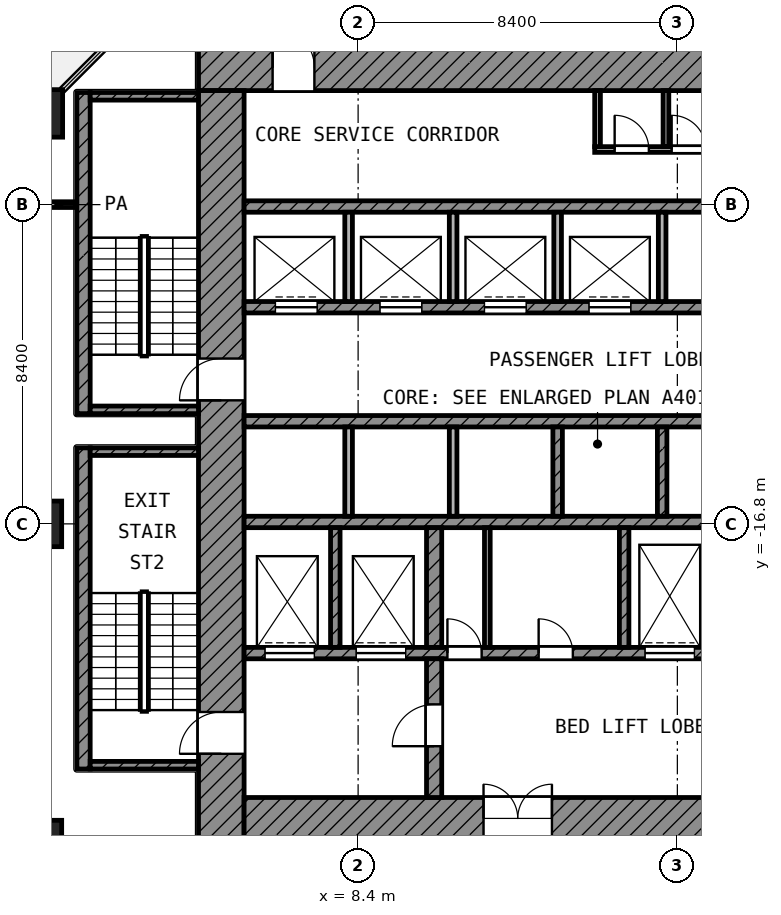
"""IFC4 building model, lengths in metres.
Left out: names, types, materials, properties, quantities, classifications, styles, units other than length and angle.
Written with IfcOpenShell. Run it as: python <this file> out.ifc"""

import sys

from ifc_helpers import new_model, si_unit, direction, frame, frame_2d, origin, origin_2d, place, context, subcontext, project, spatial, rectangle, extrude, element, fill, save


model = new_model("IFC4")
c1 = context("Model", 3, precision=1e-05, world=origin(), true_north=direction((0.0, 1.0)))
c2 = subcontext(c1, "Body", "Model", "MODEL_VIEW")
j1 = project(units=[si_unit("LENGTHUNIT", "METRE"), si_unit("PLANEANGLEUNIT", "RADIAN")], contexts=[c1])
p1 = place(None, origin())
s1 = spatial("IfcSite", under=j1, at=p1, CompositionType="ELEMENT")
p2 = place(p1, origin())
s2 = spatial("IfcBuilding", under=s1, at=p2, CompositionType="ELEMENT")
p3 = place(p2, frame((0.0, 0.0, 85.4)))
s3 = spatial("IfcBuildingStorey", under=s2, at=p3, CompositionType="ELEMENT", Elevation=85.4)
p4 = place(p3, frame((0.0, -6.0, 0.0), z_axis=(0.0, 0.0, 1.0), x_axis=(1.0, 0.0, 0.0)))
e1 = element("IfcColumn", 1, at=p4, inside=s3, PredefinedType="COLUMN", context=c2, shape_type="SweptSolid", body=[
    extrude(rectangle(XDim=1.25, YDim=1.25, at=origin_2d()), origin(), (0.0, 0.0, 1.0), 4.2),
])
for number, where, z_axis, x_axis in (
    (2, (0.0, -16.8, 0.0), (0.0, 0.0, 1.0), (1.0, 0.0, 0.0)),
    (3, (0.0, -25.2, 0.0), (0.0, 0.0, 1.0), (1.0, 0.0, 0.0)),
):
    element("IfcColumn", number, at=place(p3, frame(where, z_axis=z_axis, x_axis=x_axis)), inside=s3, PredefinedType="COLUMN", context=c2, shape_type="SweptSolid", body=[
        extrude(rectangle(XDim=1.2, YDim=1.2, at=origin_2d()), origin(), (0.0, 0.0, 1.0), 4.2),
    ])
p5 = place(p3, frame((4.2, -4.8, 0.0), z_axis=(0.0, 0.0, 1.0), x_axis=(1.0, 0.0, 0.0)))
e4 = element("IfcWall", 4, at=p5, inside=s3, PredefinedType="SHEAR", context=c2, shape_type="SweptSolid", body=[
    extrude(rectangle(XDim=20.9, YDim=1.2, at=frame_2d((10.45, 0.0))), origin(), (0.0, 0.0, 1.0), 3.9),
])
p6 = place(p5, frame((1.95, 0.0, 0.0)))
e5 = element("IfcOpeningElement", 5, at=p6, cuts=e4, PredefinedType="OPENING", context=c2, shape_type="SweptSolid", body=[
    extrude(rectangle(XDim=1.1, YDim=2.1, at=frame_2d((0.55, 1.05))), frame((0.0, 0.61, 0.0), z_axis=(0.0, -1.0, 0.0), x_axis=(1.0, 0.0, 0.0)), (0.0, 0.0, 1.0), 1.22),
])
p7 = place(p5, frame((17.95, 0.0, 0.0)))
e6 = element("IfcOpeningElement", 6, at=p7, cuts=e4, PredefinedType="OPENING", context=c2, shape_type="SweptSolid", body=[
    extrude(rectangle(XDim=1.1, YDim=2.1, at=frame_2d((0.55, 1.05))), frame((0.0, 0.61, 0.0), z_axis=(0.0, -1.0, 0.0), x_axis=(1.0, 0.0, 0.0)), (0.0, 0.0, 1.0), 1.22),
])
p8 = place(p3, frame((4.8, -25.1, 0.0), z_axis=(0.0, 0.0, 1.0), x_axis=(0.0, 1.0, 0.0)))
e7 = element("IfcWall", 7, at=p8, inside=s3, PredefinedType="SHEAR", context=c2, shape_type="SweptSolid", body=[
    extrude(rectangle(XDim=19.7, YDim=1.2, at=frame_2d((9.85, 0.0))), origin(), (0.0, 0.0, 1.0), 3.9),
])
p9 = place(p8, frame((11.55, 0.0, 0.0)))
e8 = element("IfcOpeningElement", 8, at=p9, cuts=e7, PredefinedType="OPENING", context=c2, shape_type="SweptSolid", body=[
    extrude(rectangle(XDim=1.1, YDim=2.1, at=frame_2d((0.55, 1.05))), frame((0.0, 0.61, 0.0), z_axis=(0.0, -1.0, 0.0), x_axis=(1.0, 0.0, 0.0)), (0.0, 0.0, 1.0), 1.22),
])
p10 = place(p8, frame((2.25, 0.0, 0.0)))
e9 = element("IfcOpeningElement", 9, at=p10, cuts=e7, PredefinedType="OPENING", context=c2, shape_type="SweptSolid", body=[
    extrude(rectangle(XDim=1.1, YDim=2.1, at=frame_2d((0.55, 1.05))), frame((0.0, 0.61, 0.0), z_axis=(0.0, -1.0, 0.0), x_axis=(1.0, 0.0, 0.0)), (0.0, 0.0, 1.0), 1.22),
])
p11 = place(p3, frame((5.4, -24.55, 0.0), z_axis=(0.0, 0.0, 1.0), x_axis=(1.0, 0.0, 0.0)))
e10 = element("IfcWall", 10, at=p11, inside=s3, PredefinedType="SHEAR", context=c2, shape_type="SweptSolid", body=[
    extrude(rectangle(XDim=18.6, YDim=1.1, at=frame_2d((9.3, 0.0))), origin(), (0.0, 0.0, 1.0), 3.9),
])
p12 = place(p11, frame((6.3, 0.0, 0.0)))
e11 = element("IfcOpeningElement", 11, at=p12, cuts=e10, PredefinedType="OPENING", context=c2, shape_type="SweptSolid", body=[
    extrude(rectangle(XDim=1.8, YDim=2.1, at=frame_2d((0.9, 1.05))), frame((0.0, 0.56, 0.0), z_axis=(0.0, -1.0, 0.0), x_axis=(1.0, 0.0, 0.0)), (0.0, 0.0, 1.0), 1.12),
])
p13 = place(p3, frame((5.4, -8.45, 0.0), z_axis=(0.0, 0.0, 1.0), x_axis=(1.0, 0.0, 0.0)))
e12 = element("IfcWall", 12, at=p13, inside=s3, PredefinedType="SHEAR", context=c2, shape_type="SweptSolid", body=[
    extrude(rectangle(XDim=16.65, YDim=0.3, at=frame_2d((8.325, 0.0))), origin(), (0.0, 0.0, 1.0), 3.9),
])
p14 = place(p3, frame((5.4, -11.1, 0.0), z_axis=(0.0, 0.0, 1.0), x_axis=(1.0, 0.0, 0.0)))
e13 = element("IfcWall", 13, at=p14, inside=s3, PredefinedType="SHEAR", context=c2, shape_type="SweptSolid", body=[
    extrude(rectangle(XDim=16.65, YDim=0.3, at=frame_2d((8.325, 0.0))), origin(), (0.0, 0.0, 1.0), 3.9),
])
p15 = place(p14, frame((0.825, 0.0, 0.0)))
e14 = element("IfcOpeningElement", 14, at=p15, cuts=e13, PredefinedType="OPENING", context=c2, shape_type="SweptSolid", body=[
    extrude(rectangle(XDim=1.1, YDim=2.1, at=frame_2d((0.55, 1.05))), frame((0.0, 0.16, 0.0), z_axis=(0.0, -1.0, 0.0), x_axis=(1.0, 0.0, 0.0)), (0.0, 0.0, 1.0), 0.32),
])
p16 = place(p14, frame((3.575, 0.0, 0.0)))
e15 = element("IfcOpeningElement", 15, at=p16, cuts=e13, PredefinedType="OPENING", context=c2, shape_type="SweptSolid", body=[
    extrude(rectangle(XDim=1.1, YDim=2.1, at=frame_2d((0.55, 1.05))), frame((0.0, 0.16, 0.0), z_axis=(0.0, -1.0, 0.0), x_axis=(1.0, 0.0, 0.0)), (0.0, 0.0, 1.0), 0.32),
])
p17 = place(p14, frame((6.325, 0.0, 0.0)))
e16 = element("IfcOpeningElement", 16, at=p17, cuts=e13, PredefinedType="OPENING", context=c2, shape_type="SweptSolid", body=[
    extrude(rectangle(XDim=1.1, YDim=2.1, at=frame_2d((0.55, 1.05))), frame((0.0, 0.16, 0.0), z_axis=(0.0, -1.0, 0.0), x_axis=(1.0, 0.0, 0.0)), (0.0, 0.0, 1.0), 0.32),
])
p18 = place(p14, frame((9.075, 0.0, 0.0)))
e17 = element("IfcOpeningElement", 17, at=p18, cuts=e13, PredefinedType="OPENING", context=c2, shape_type="SweptSolid", body=[
    extrude(rectangle(XDim=1.1, YDim=2.1, at=frame_2d((0.55, 1.05))), frame((0.0, 0.16, 0.0), z_axis=(0.0, -1.0, 0.0), x_axis=(1.0, 0.0, 0.0)), (0.0, 0.0, 1.0), 0.32),
])
for number, where, z_axis, x_axis in (
    (18, (5.4, -14.1, 0.0), (0.0, 0.0, 1.0), (1.0, 0.0, 0.0)),
    (19, (5.4, -16.75, 0.0), (0.0, 0.0, 1.0), (1.0, 0.0, 0.0)),
):
    element("IfcWall", number, at=place(p3, frame(where, z_axis=z_axis, x_axis=x_axis)), inside=s3, PredefinedType="SHEAR", context=c2, shape_type="SweptSolid", body=[
        extrude(rectangle(XDim=16.65, YDim=0.3, at=frame_2d((8.325, 0.0))), origin(), (0.0, 0.0, 1.0), 3.9),
    ])
p19 = place(p3, frame((5.4, -20.2, 0.0), z_axis=(0.0, 0.0, 1.0), x_axis=(1.0, 0.0, 0.0)))
e20 = element("IfcWall", 20, at=p19, inside=s3, PredefinedType="SHEAR", context=c2, shape_type="SweptSolid", body=[
    extrude(rectangle(XDim=14.65, YDim=0.3, at=frame_2d((7.325, 0.0))), origin(), (0.0, 0.0, 1.0), 3.9),
])
p20 = place(p19, frame((10.55, 0.0, 0.0)))
e21 = element("IfcOpeningElement", 21, at=p20, cuts=e20, PredefinedType="OPENING", context=c2, shape_type="SweptSolid", body=[
    extrude(rectangle(XDim=1.3, YDim=2.1, at=frame_2d((0.65, 1.05))), frame((0.0, 0.16, 0.0), z_axis=(0.0, -1.0, 0.0), x_axis=(1.0, 0.0, 0.0)), (0.0, 0.0, 1.0), 0.32),
])
p21 = place(p19, frame((12.95, 0.0, 0.0)))
e22 = element("IfcOpeningElement", 22, at=p21, cuts=e20, PredefinedType="OPENING", context=c2, shape_type="SweptSolid", body=[
    extrude(rectangle(XDim=1.3, YDim=2.1, at=frame_2d((0.65, 1.05))), frame((0.0, 0.16, 0.0), z_axis=(0.0, -1.0, 0.0), x_axis=(1.0, 0.0, 0.0)), (0.0, 0.0, 1.0), 0.32),
])
p22 = place(p19, frame((0.55, 0.0, 0.0)))
e23 = element("IfcOpeningElement", 23, at=p22, cuts=e20, PredefinedType="OPENING", context=c2, shape_type="SweptSolid", body=[
    extrude(rectangle(XDim=1.3, YDim=2.1, at=frame_2d((0.65, 1.05))), frame((0.0, 0.16, 0.0), z_axis=(0.0, -1.0, 0.0), x_axis=(1.0, 0.0, 0.0)), (0.0, 0.0, 1.0), 0.32),
])
p23 = place(p19, frame((2.95, 0.0, 0.0)))
e24 = element("IfcOpeningElement", 24, at=p23, cuts=e20, PredefinedType="OPENING", context=c2, shape_type="SweptSolid", body=[
    extrude(rectangle(XDim=1.3, YDim=2.1, at=frame_2d((0.65, 1.05))), frame((0.0, 0.16, 0.0), z_axis=(0.0, -1.0, 0.0), x_axis=(1.0, 0.0, 0.0)), (0.0, 0.0, 1.0), 0.32),
])
p24 = place(p19, frame((5.35, 0.0, 0.0)))
e25 = element("IfcOpeningElement", 25, at=p24, cuts=e20, PredefinedType="OPENING", context=c2, shape_type="SweptSolid", body=[
    extrude(rectangle(XDim=0.9, YDim=2.1, at=frame_2d((0.45, 1.05))), frame((0.0, 0.16, 0.0), z_axis=(0.0, -1.0, 0.0), x_axis=(1.0, 0.0, 0.0)), (0.0, 0.0, 1.0), 0.32),
])
p25 = place(p19, frame((7.75, 0.0, 0.0)))
e26 = element("IfcOpeningElement", 26, at=p25, cuts=e20, PredefinedType="OPENING", context=c2, shape_type="SweptSolid", body=[
    extrude(rectangle(XDim=0.9, YDim=2.1, at=frame_2d((0.45, 1.05))), frame((0.0, 0.16, 0.0), z_axis=(0.0, -1.0, 0.0), x_axis=(1.0, 0.0, 0.0)), (0.0, 0.0, 1.0), 0.32),
])
p26 = place(p3, frame((10.4, -24.0, 0.0), z_axis=(0.0, 0.0, 1.0), x_axis=(0.0, 1.0, 0.0)))
e27 = element("IfcWall", 27, at=p26, inside=s3, PredefinedType="SHEAR", context=c2, shape_type="SweptSolid", body=[
    extrude(rectangle(XDim=3.65, YDim=0.4, at=frame_2d((1.825, 0.0))), origin(), (0.0, 0.0, 1.0), 3.9),
])
p27 = place(p26, frame((1.35, 0.0, 0.0)))
e28 = element("IfcOpeningElement", 28, at=p27, cuts=e27, PredefinedType="OPENING", context=c2, shape_type="SweptSolid", body=[
    extrude(rectangle(XDim=1.1, YDim=2.1, at=frame_2d((0.55, 1.05))), frame((0.0, 0.21, 0.0), z_axis=(0.0, -1.0, 0.0), x_axis=(1.0, 0.0, 0.0)), (0.0, 0.0, 1.0), 0.42),
])
p28 = place(p3, frame((10.4, -20.05, 0.0), z_axis=(0.0, 0.0, 1.0), x_axis=(0.0, 1.0, 0.0)))
e29 = element("IfcWall", 29, at=p28, inside=s3, PredefinedType="SHEAR", context=c2, shape_type="SweptSolid", body=[
    extrude(rectangle(XDim=3.15, YDim=0.4, at=frame_2d((1.575, 0.0))), origin(), (0.0, 0.0, 1.0), 3.9),
])
for number, where, z_axis, x_axis in (
    (30, (7.8, -20.05, 0.0), (0.0, 0.0, 1.0), (0.0, 1.0, 0.0)),
    (31, (15.4, -20.05, 0.0), (0.0, 0.0, 1.0), (0.0, 1.0, 0.0)),
):
    element("IfcWall", number, at=place(p3, frame(where, z_axis=z_axis, x_axis=x_axis)), inside=s3, PredefinedType="SHEAR", context=c2, shape_type="SweptSolid", body=[
        extrude(rectangle(XDim=3.15, YDim=0.25, at=frame_2d((1.575, 0.0))), origin(), (0.0, 0.0, 1.0), 3.9),
    ])
for number, where, z_axis, x_axis in (
    (32, (8.15, -10.95, 0.0), (0.0, 0.0, 1.0), (0.0, 1.0, 0.0)),
    (33, (10.9, -10.95, 0.0), (0.0, 0.0, 1.0), (0.0, 1.0, 0.0)),
    (34, (13.65, -10.95, 0.0), (0.0, 0.0, 1.0), (0.0, 1.0, 0.0)),
    (35, (16.4, -10.95, 0.0), (0.0, 0.0, 1.0), (0.0, 1.0, 0.0)),
):
    element("IfcWall", number, at=place(p3, frame(where, z_axis=z_axis, x_axis=x_axis)), inside=s3, PredefinedType="PARTITIONING", context=c2, shape_type="SweptSolid", body=[
        extrude(rectangle(XDim=2.35, YDim=0.2, at=frame_2d((1.175, 0.0))), origin(), (0.0, 0.0, 1.0), 3.9),
    ])
for number, where, z_axis, x_axis in (
    (36, (8.15, -16.6, 0.0), (0.0, 0.0, 1.0), (0.0, 1.0, 0.0)),
    (37, (10.9, -16.6, 0.0), (0.0, 0.0, 1.0), (0.0, 1.0, 0.0)),
):
    element("IfcWall", number, at=place(p3, frame(where, z_axis=z_axis, x_axis=x_axis)), inside=s3, PredefinedType="PARTITIONING", context=c2, shape_type="SweptSolid", body=[
        extrude(rectangle(XDim=2.35, YDim=0.2, at=frame_2d((1.175, 0.0))), origin(), (0.0, 0.0, 1.0), 3.9),
    ])
for number, where, z_axis, x_axis in (
    (38, (13.65, -16.6, 0.0), (0.0, 0.0, 1.0), (0.0, 1.0, 0.0)),
    (39, (16.4, -16.6, 0.0), (0.0, 0.0, 1.0), (0.0, 1.0, 0.0)),
):
    element("IfcWall", number, at=place(p3, frame(where, z_axis=z_axis, x_axis=x_axis)), inside=s3, PredefinedType="SHEAR", context=c2, shape_type="SweptSolid", body=[
        extrude(rectangle(XDim=2.35, YDim=0.25, at=frame_2d((1.175, 0.0))), origin(), (0.0, 0.0, 1.0), 3.9),
    ])
p29 = place(p3, frame((14.625, -6.95, 0.0), z_axis=(0.0, 0.0, 1.0), x_axis=(1.0, 0.0, 0.0)))
e40 = element("IfcWall", 40, at=p29, inside=s3, PredefinedType="PARTITIONING", context=c2, shape_type="SweptSolid", body=[
    extrude(rectangle(XDim=6.45, YDim=0.15, at=frame_2d((3.225, 0.0))), origin(), (0.0, 0.0, 1.0), 3.9),
])
p30 = place(p29, frame((0.525, 0.0, 0.0)))
e41 = element("IfcOpeningElement", 41, at=p30, cuts=e40, PredefinedType="OPENING", context=c2, shape_type="SweptSolid", body=[
    extrude(rectangle(XDim=0.9, YDim=2.1, at=frame_2d((0.45, 1.05))), frame((0.0, 0.085, 0.0), z_axis=(0.0, -1.0, 0.0), x_axis=(1.0, 0.0, 0.0)), (0.0, 0.0, 1.0), 0.17),
])
p31 = place(p29, frame((2.025, 0.0, 0.0)))
e42 = element("IfcOpeningElement", 42, at=p31, cuts=e40, PredefinedType="OPENING", context=c2, shape_type="SweptSolid", body=[
    extrude(rectangle(XDim=0.9, YDim=2.1, at=frame_2d((0.45, 1.05))), frame((0.0, 0.085, 0.0), z_axis=(0.0, -1.0, 0.0), x_axis=(1.0, 0.0, 0.0)), (0.0, 0.0, 1.0), 0.17),
])
p32 = place(p29, frame((3.825, 0.0, 0.0)))
e43 = element("IfcOpeningElement", 43, at=p32, cuts=e40, PredefinedType="OPENING", context=c2, shape_type="SweptSolid", body=[
    extrude(rectangle(XDim=0.9, YDim=2.1, at=frame_2d((0.45, 1.05))), frame((0.0, 0.085, 0.0), z_axis=(0.0, -1.0, 0.0), x_axis=(1.0, 0.0, 0.0)), (0.0, 0.0, 1.0), 0.17),
])
p33 = place(p29, frame((5.475, 0.0, 0.0)))
e44 = element("IfcOpeningElement", 44, at=p33, cuts=e40, PredefinedType="OPENING", context=c2, shape_type="SweptSolid", body=[
    extrude(rectangle(XDim=0.9, YDim=2.1, at=frame_2d((0.45, 1.05))), frame((0.0, 0.085, 0.0), z_axis=(0.0, -1.0, 0.0), x_axis=(1.0, 0.0, 0.0)), (0.0, 0.0, 1.0), 0.17),
])
p34 = place(p3, frame((11.8, -20.05, 0.0), z_axis=(0.0, 0.0, 1.0), x_axis=(0.0, 1.0, 0.0)))
e45 = element("IfcWall", 45, at=p34, inside=s3, PredefinedType="PARTITIONING", context=c2, shape_type="SweptSolid", body=[
    extrude(rectangle(XDim=3.15, YDim=0.15, at=frame_2d((1.575, 0.0))), origin(), (0.0, 0.0, 1.0), 3.9),
])
for number, where, z_axis, x_axis in (
    (46, (14.7, -6.875, 0.0), (0.0, 0.0, 1.0), (0.0, 1.0, 0.0)),
    (47, (16.5, -6.875, 0.0), (0.0, 0.0, 1.0), (0.0, 1.0, 0.0)),
):
    element("IfcWall", number, at=place(p3, frame(where, z_axis=z_axis, x_axis=x_axis)), inside=s3, PredefinedType="PARTITIONING", context=c2, shape_type="SweptSolid", body=[
        extrude(rectangle(XDim=1.475, YDim=0.15, at=frame_2d((0.738, 0.0))), origin(), (0.0, 0.0, 1.0), 3.9),
    ])
p35 = place(p3, frame((1.175, -13.9, 0.0), z_axis=(0.0, 0.0, 1.0), x_axis=(0.0, 1.0, 0.0)))
e48 = element("IfcWall", 48, at=p35, inside=s3, PredefinedType="SHEAR", context=c2, shape_type="SweptSolid", body=[
    extrude(rectangle(XDim=8.45, YDim=0.35, at=frame_2d((4.225, 0.0))), origin(), (0.0, 0.0, 1.0), 3.9),
])
for number, where, z_axis, x_axis in (
    (49, (1.35, -5.55, 0.0), (0.0, 0.0, 1.0), (1.0, 0.0, 0.0)),
    (50, (1.35, -13.8, 0.0), (0.0, 0.0, 1.0), (1.0, 0.0, 0.0)),
):
    element("IfcWall", number, at=place(p3, frame(where, z_axis=z_axis, x_axis=x_axis)), inside=s3, PredefinedType="SHEAR", context=c2, shape_type="SweptSolid", body=[
        extrude(rectangle(XDim=2.85, YDim=0.2, at=frame_2d((1.425, 0.0))), origin(), (0.0, 0.0, 1.0), 3.9),
    ])
p36 = place(p3, frame((1.175, -23.25, 0.0), z_axis=(0.0, 0.0, 1.0), x_axis=(0.0, 1.0, 0.0)))
e51 = element("IfcWall", 51, at=p36, inside=s3, PredefinedType="SHEAR", context=c2, shape_type="SweptSolid", body=[
    extrude(rectangle(XDim=8.45, YDim=0.35, at=frame_2d((4.225, 0.0))), origin(), (0.0, 0.0, 1.0), 3.9),
])
for number, where, z_axis, x_axis in (
    (52, (1.35, -14.9, 0.0), (0.0, 0.0, 1.0), (1.0, 0.0, 0.0)),
    (53, (1.35, -23.15, 0.0), (0.0, 0.0, 1.0), (1.0, 0.0, 0.0)),
):
    element("IfcWall", number, at=place(p3, frame(where, z_axis=z_axis, x_axis=x_axis)), inside=s3, PredefinedType="SHEAR", context=c2, shape_type="SweptSolid", body=[
        extrude(rectangle(XDim=2.85, YDim=0.2, at=frame_2d((1.425, 0.0))), origin(), (0.0, 0.0, 1.0), 3.9),
    ])
p37 = place(p3, frame((0.08, -8.4, 0.0), z_axis=(0.0, 0.0, 1.0), x_axis=(1.0, 0.0, 0.0)))
e54 = element("IfcWall", 54, at=p37, inside=s3, PredefinedType="PARTITIONING", context=c2, shape_type="SweptSolid", body=[
    extrude(rectangle(XDim=0.89, YDim=0.15, at=frame_2d((0.445, 0.0))), origin(), (0.0, 0.0, 1.0), 3.9),
])
p38 = place(p15, origin())
e55 = element("IfcDoor", 55, at=p38, inside=s3, OperationType="DOUBLE_DOOR_SLIDING", PredefinedType="DOOR", context=c2, shape_type="SweptSolid", body=[
    extrude(rectangle(XDim=1.1, YDim=2.1, at=frame_2d((0.55, 1.05))), frame((0.0, 0.025, 0.0), z_axis=(0.0, -1.0, 0.0), x_axis=(1.0, 0.0, 0.0)), (0.0, 0.0, 1.0), 0.05),
])
fill(e14, e55)
p39 = place(p16, origin())
e56 = element("IfcDoor", 56, at=p39, inside=s3, OperationType="DOUBLE_DOOR_SLIDING", PredefinedType="DOOR", context=c2, shape_type="SweptSolid", body=[
    extrude(rectangle(XDim=1.1, YDim=2.1, at=frame_2d((0.55, 1.05))), frame((0.0, 0.025, 0.0), z_axis=(0.0, -1.0, 0.0), x_axis=(1.0, 0.0, 0.0)), (0.0, 0.0, 1.0), 0.05),
])
fill(e15, e56)
p40 = place(p17, origin())
e57 = element("IfcDoor", 57, at=p40, inside=s3, OperationType="DOUBLE_DOOR_SLIDING", PredefinedType="DOOR", context=c2, shape_type="SweptSolid", body=[
    extrude(rectangle(XDim=1.1, YDim=2.1, at=frame_2d((0.55, 1.05))), frame((0.0, 0.025, 0.0), z_axis=(0.0, -1.0, 0.0), x_axis=(1.0, 0.0, 0.0)), (0.0, 0.0, 1.0), 0.05),
])
fill(e16, e57)
p41 = place(p18, origin())
e58 = element("IfcDoor", 58, at=p41, inside=s3, OperationType="DOUBLE_DOOR_SLIDING", PredefinedType="DOOR", context=c2, shape_type="SweptSolid", body=[
    extrude(rectangle(XDim=1.1, YDim=2.1, at=frame_2d((0.55, 1.05))), frame((0.0, 0.025, 0.0), z_axis=(0.0, -1.0, 0.0), x_axis=(1.0, 0.0, 0.0)), (0.0, 0.0, 1.0), 0.05),
])
fill(e17, e58)
p42 = place(p20, origin())
e59 = element("IfcDoor", 59, at=p42, inside=s3, OperationType="DOUBLE_DOOR_SLIDING", PredefinedType="DOOR", context=c2, shape_type="SweptSolid", body=[
    extrude(rectangle(XDim=1.3, YDim=2.1, at=frame_2d((0.65, 1.05))), frame((0.0, 0.025, 0.0), z_axis=(0.0, -1.0, 0.0), x_axis=(1.0, 0.0, 0.0)), (0.0, 0.0, 1.0), 0.05),
])
fill(e21, e59)
p43 = place(p22, origin())
e60 = element("IfcDoor", 60, at=p43, inside=s3, OperationType="DOUBLE_DOOR_SLIDING", PredefinedType="DOOR", context=c2, shape_type="SweptSolid", body=[
    extrude(rectangle(XDim=1.3, YDim=2.1, at=frame_2d((0.65, 1.05))), frame((0.0, 0.025, 0.0), z_axis=(0.0, -1.0, 0.0), x_axis=(1.0, 0.0, 0.0)), (0.0, 0.0, 1.0), 0.05),
])
fill(e23, e60)
p44 = place(p23, origin())
e61 = element("IfcDoor", 61, at=p44, inside=s3, OperationType="DOUBLE_DOOR_SLIDING", PredefinedType="DOOR", context=c2, shape_type="SweptSolid", body=[
    extrude(rectangle(XDim=1.3, YDim=2.1, at=frame_2d((0.65, 1.05))), frame((0.0, 0.025, 0.0), z_axis=(0.0, -1.0, 0.0), x_axis=(1.0, 0.0, 0.0)), (0.0, 0.0, 1.0), 0.05),
])
fill(e24, e61)
p45 = place(p9, origin())
e62 = element("IfcDoor", 62, at=p45, inside=s3, OperationType="SINGLE_SWING_LEFT", PredefinedType="DOOR", context=c2, shape_type="SweptSolid", body=[
    extrude(rectangle(XDim=1.1, YDim=2.1, at=frame_2d((0.55, 1.05))), frame((0.0, 0.025, 0.0), z_axis=(0.0, -1.0, 0.0), x_axis=(1.0, 0.0, 0.0)), (0.0, 0.0, 1.0), 0.05),
])
fill(e8, e62)
p46 = place(p10, origin())
e63 = element("IfcDoor", 63, at=p46, inside=s3, OperationType="SINGLE_SWING_LEFT", PredefinedType="DOOR", context=c2, shape_type="SweptSolid", body=[
    extrude(rectangle(XDim=1.1, YDim=2.1, at=frame_2d((0.55, 1.05))), frame((0.0, 0.025, 0.0), z_axis=(0.0, -1.0, 0.0), x_axis=(1.0, 0.0, 0.0)), (0.0, 0.0, 1.0), 0.05),
])
fill(e9, e63)
p47 = place(p6, origin())
e64 = element("IfcDoor", 64, at=p47, inside=s3, OperationType="SINGLE_SWING_LEFT", PredefinedType="DOOR", context=c2, shape_type="SweptSolid", body=[
    extrude(rectangle(XDim=1.1, YDim=2.1, at=frame_2d((0.55, 1.05))), frame((0.0, 0.025, 0.0), z_axis=(0.0, -1.0, 0.0), x_axis=(1.0, 0.0, 0.0)), (0.0, 0.0, 1.0), 0.05),
])
fill(e5, e64)
p48 = place(p27, origin())
e65 = element("IfcDoor", 65, at=p48, inside=s3, OperationType="SINGLE_SWING_LEFT", PredefinedType="DOOR", context=c2, shape_type="SweptSolid", body=[
    extrude(rectangle(XDim=1.1, YDim=2.1, at=frame_2d((0.55, 1.05))), frame((0.0, 0.025, 0.0), z_axis=(0.0, -1.0, 0.0), x_axis=(1.0, 0.0, 0.0)), (0.0, 0.0, 1.0), 0.05),
])
fill(e28, e65)
p49 = place(p12, origin())
e66 = element("IfcDoor", 66, at=p49, inside=s3, OperationType="DOUBLE_DOOR_SINGLE_SWING", PredefinedType="DOOR", context=c2, shape_type="SweptSolid", body=[
    extrude(rectangle(XDim=1.8, YDim=2.1, at=frame_2d((0.9, 1.05))), frame((0.0, 0.025, 0.0), z_axis=(0.0, -1.0, 0.0), x_axis=(1.0, 0.0, 0.0)), (0.0, 0.0, 1.0), 0.05),
])
fill(e11, e66)
p50 = place(p30, origin())
e67 = element("IfcDoor", 67, at=p50, inside=s3, OperationType="SINGLE_SWING_LEFT", PredefinedType="DOOR", context=c2, shape_type="SweptSolid", body=[
    extrude(rectangle(XDim=0.9, YDim=2.1, at=frame_2d((0.45, 1.05))), frame((0.0, 0.025, 0.0), z_axis=(0.0, -1.0, 0.0), x_axis=(1.0, 0.0, 0.0)), (0.0, 0.0, 1.0), 0.05),
])
fill(e41, e67)
p51 = place(p31, origin())
e68 = element("IfcDoor", 68, at=p51, inside=s3, OperationType="SINGLE_SWING_LEFT", PredefinedType="DOOR", context=c2, shape_type="SweptSolid", body=[
    extrude(rectangle(XDim=0.9, YDim=2.1, at=frame_2d((0.45, 1.05))), frame((0.0, 0.025, 0.0), z_axis=(0.0, -1.0, 0.0), x_axis=(1.0, 0.0, 0.0)), (0.0, 0.0, 1.0), 0.05),
])
fill(e42, e68)
p52 = place(p24, origin())
e69 = element("IfcDoor", 69, at=p52, inside=s3, OperationType="SINGLE_SWING_LEFT", PredefinedType="DOOR", context=c2, shape_type="SweptSolid", body=[
    extrude(rectangle(XDim=0.9, YDim=2.1, at=frame_2d((0.45, 1.05))), frame((0.0, 0.025, 0.0), z_axis=(0.0, -1.0, 0.0), x_axis=(1.0, 0.0, 0.0)), (0.0, 0.0, 1.0), 0.05),
])
fill(e25, e69)
p53 = place(p25, origin())
e70 = element("IfcDoor", 70, at=p53, inside=s3, OperationType="SINGLE_SWING_LEFT", PredefinedType="DOOR", context=c2, shape_type="SweptSolid", body=[
    extrude(rectangle(XDim=0.9, YDim=2.1, at=frame_2d((0.45, 1.05))), frame((0.0, 0.025, 0.0), z_axis=(0.0, -1.0, 0.0), x_axis=(1.0, 0.0, 0.0)), (0.0, 0.0, 1.0), 0.05),
])
fill(e26, e70)
save(model, sys.argv[1])
